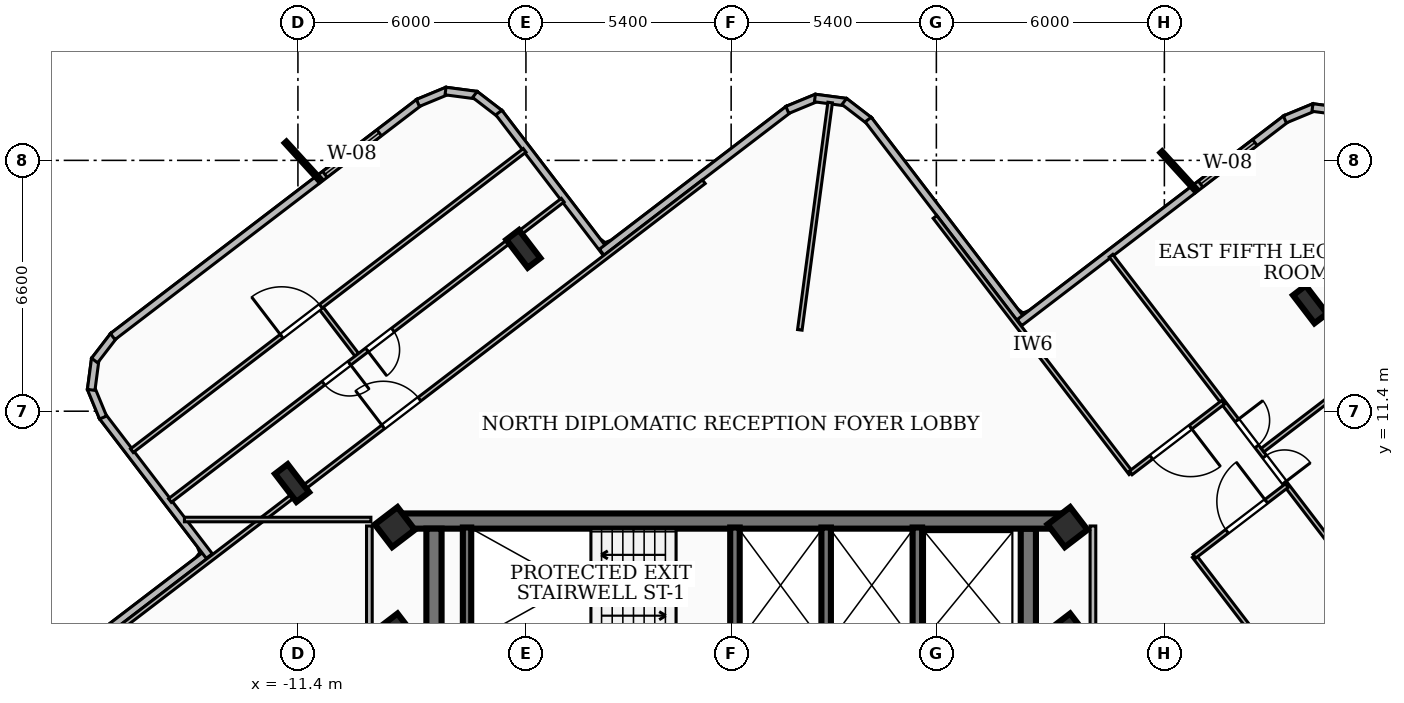
"""IFC4 building model, lengths in metres.
Left out: names, types, materials, properties, quantities, classifications, styles, units other than length and angle.
Written with IfcOpenShell. Run it as: python <this file> out.ifc"""

import sys

from ifc_helpers import new_model, si_unit, direction, frame, frame_2d, origin, origin_2d, place, context, subcontext, project, spatial, rectangle, i_section, extrude, element, fill, save


model = new_model("IFC4")
c1 = context("Model", 3, precision=1e-05, world=origin(), true_north=direction((0.0, 1.0)))
c2 = subcontext(c1, "Body", "Model", "MODEL_VIEW")
j1 = project(units=[si_unit("LENGTHUNIT", "METRE"), si_unit("PLANEANGLEUNIT", "RADIAN")], contexts=[c1])
p1 = place(None, origin())
s1 = spatial("IfcSite", under=j1, at=p1, CompositionType="ELEMENT")
p2 = place(p1, origin())
s2 = spatial("IfcBuilding", under=s1, at=p2, CompositionType="ELEMENT")
p3 = place(p2, frame((0.0, 0.0, 229.14)))
s3 = spatial("IfcBuildingStorey", under=s2, at=p3, CompositionType="ELEMENT", Elevation=229.14)
p4 = place(p3, frame((-8.78, 8.51, 0.0), z_axis=(0.0, 0.0, 1.0), x_axis=(1.0, 0.0, 0.0)))
e1 = element("IfcWall", 1, at=p4, inside=s3, PredefinedType="SHEAR", context=c2, shape_type="SweptSolid", body=[
    extrude(rectangle(XDim=17.56, YDim=0.4, at=frame_2d((8.78, 0.0))), origin(), (0.0, 0.0, 1.0), 3.14),
])
for number, where, z_axis, x_axis in (
    (2, (-7.82, 1.95, 0.0), (0.0, 0.0, 1.0), (0.0, 1.0, 0.0)),
    (3, (7.82, 8.31, 0.0), (0.0, 0.0, 1.0), (0.0, -1.0, 0.0)),
):
    element("IfcWall", number, at=place(p3, frame(where, z_axis=z_axis, x_axis=x_axis)), inside=s3, PredefinedType="SHEAR", context=c2, shape_type="SweptSolid", body=[
        extrude(rectangle(XDim=6.36, YDim=0.4, at=frame_2d((3.18, 0.0))), origin(), (0.0, 0.0, 1.0), 3.14),
    ])
p5 = place(p3, frame((-6.95, 5.28, 0.0), z_axis=(0.0, 0.0, 1.0), x_axis=(0.0, 1.0, 0.0)))
e4 = element("IfcWall", 4, at=p5, inside=s3, PredefinedType="SOLIDWALL", context=c2, shape_type="SweptSolid", body=[
    extrude(rectangle(XDim=3.06, YDim=0.22, at=frame_2d((1.53, 0.0))), origin(), (0.0, 0.0, 1.0), 3.14),
])
for number, where, z_axis, x_axis in (
    (5, (0.1, 5.3, 0.0), (0.0, 0.0, 1.0), (0.0, 1.0, 0.0)),
    (6, (2.5, 5.3, 0.0), (0.0, 0.0, 1.0), (0.0, 1.0, 0.0)),
    (7, (4.9, 5.3, 0.0), (0.0, 0.0, 1.0), (0.0, 1.0, 0.0)),
):
    element("IfcWall", number, at=place(p3, frame(where, z_axis=z_axis, x_axis=x_axis)), inside=s3, PredefinedType="SOLIDWALL", context=c2, shape_type="SweptSolid", body=[
        extrude(rectangle(XDim=3.04, YDim=0.25, at=frame_2d((1.52, 0.0))), origin(), (0.0, 0.0, 1.0), 3.14),
    ])
for number, where, z_axis, x_axis in (
    (8, (-8.85, 5.55, 0.0), (0.0, 0.0, 1.0), (0.794, 0.607, 0.0)),
    (9, (8.85, 5.55, 0.0), (0.0, 0.0, 1.0), (0.794, 0.607, 0.0)),
    (10, (-8.85, 8.35, 0.0), (0.0, 0.0, 1.0), (0.794, 0.607, 0.0)),
    (11, (8.85, 8.35, 0.0), (0.0, 0.0, 1.0), (0.794, 0.607, 0.0)),
):
    element("IfcColumn", number, at=place(p3, frame(where, z_axis=z_axis, x_axis=x_axis)), inside=s3, PredefinedType="COLUMN", context=c2, shape_type="SweptSolid", body=[
        extrude(rectangle(XDim=0.75, YDim=0.75, at=origin_2d()), origin(), (0.0, 0.0, 1.0), 3.42),
    ])
for number, where, z_axis, x_axis in (
    (12, (15.234, 14.209, 0.0), (0.0, 0.0, 1.0), (0.794, 0.607, 0.0)),
    (13, (-5.468, 15.671, 0.0), (0.0, 0.0, 1.0), (0.794, 0.607, 0.0)),
    (14, (-11.554, 9.51, 0.0), (0.0, 0.0, 1.0), (0.794, 0.607, 0.0)),
):
    element("IfcColumn", number, at=place(p3, frame(where, z_axis=z_axis, x_axis=x_axis)), inside=s3, PredefinedType="COLUMN", context=c2, shape_type="SweptSolid", body=[
        extrude(i_section(OverallWidth=0.418, OverallDepth=0.927, WebThickness=0.019, FlangeThickness=0.032, at=origin_2d()), origin(), (0.0, 0.0, 1.0), 3.42),
    ])
p6 = place(p3, frame((-19.074, 3.607, 0.0), z_axis=(0.0, 0.0, 1.0), x_axis=(0.794465731546, 0.607308983466, 0.0)))
e15 = element("IfcWall", 15, at=p6, inside=s3, PredefinedType="SOLIDWALL", context=c2, shape_type="SweptSolid", body=[
    extrude(rectangle(XDim=6.743, YDim=0.2, at=frame_2d((3.372, 0.0))), origin(), (0.0, 0.0, 1.0), 3.14),
])
p7 = place(p3, frame((-13.732, 7.589, 0.0), z_axis=(0.0, 0.0, 1.0), x_axis=(-0.607428636372, 0.794374251669, 0.0)))
e16 = element("IfcWall", 16, at=p7, inside=s3, PredefinedType="SOLIDWALL", context=c2, shape_type="SweptSolid", body=[
    extrude(rectangle(XDim=4.643, YDim=0.2, at=frame_2d((2.321, 0.0))), origin(), (0.0, 0.0, 1.0), 3.14),
])
p8 = place(p3, frame((-16.527, 11.234, 0.0), z_axis=(0.0, 0.0, 1.0), x_axis=(-0.381408676087, 0.924406524104, 0.0)))
e17 = element("IfcWall", 17, at=p8, inside=s3, PredefinedType="SOLIDWALL", context=c2, shape_type="SweptSolid", body=[
    extrude(rectangle(XDim=0.839, YDim=0.2, at=frame_2d((0.419, 0.0))), origin(), (0.0, 0.0, 1.0), 3.14),
])
p9 = place(p3, frame((-16.84, 11.961, 0.0), z_axis=(0.0, 0.0, 1.0), x_axis=(0.131059066172, 0.991374561492, 0.0)))
e18 = element("IfcWall", 18, at=p9, inside=s3, PredefinedType="SOLIDWALL", context=c2, shape_type="SweptSolid", body=[
    extrude(rectangle(XDim=0.825, YDim=0.2, at=frame_2d((0.413, 0.0))), origin(), (0.0, 0.0, 1.0), 3.14),
])
p10 = place(p3, frame((-16.75, 12.734, 0.0), z_axis=(0.0, 0.0, 1.0), x_axis=(0.609837482774, 0.792526494575, 0.0)))
e19 = element("IfcWall", 19, at=p10, inside=s3, PredefinedType="SOLIDWALL", context=c2, shape_type="SweptSolid", body=[
    extrude(rectangle(XDim=0.838, YDim=0.2, at=frame_2d((0.419, 0.0))), origin(), (0.0, 0.0, 1.0), 3.14),
])
p11 = place(p3, frame((-16.274, 13.363, 0.0), z_axis=(0.0, 0.0, 1.0), x_axis=(0.794458044917, 0.607319038781, 0.0)))
e20 = element("IfcWall", 20, at=p11, inside=s3, PredefinedType="SOLIDWALL", context=c2, shape_type="SweptSolid", body=[
    extrude(rectangle(XDim=10.164, YDim=0.2, at=frame_2d((5.082, 0.0))), origin(), (0.0, 0.0, 1.0), 3.14),
])
p12 = place(p11, frame((7.028, 0.0, 0.85)))
e21 = element("IfcOpeningElement", 21, at=p12, cuts=e20, PredefinedType="OPENING", context=c2, shape_type="SweptSolid", body=[
    extrude(rectangle(XDim=1.8, YDim=1.8, at=frame_2d((0.9, 0.9))), frame((0.0, 0.11, 0.0), z_axis=(0.0, -1.0, 0.0), x_axis=(1.0, 0.0, 0.0)), (0.0, 0.0, 1.0), 0.22),
])
p13 = place(p3, frame((-8.242, 19.511, 0.0), z_axis=(0.0, 0.0, 1.0), x_axis=(0.924091394431, 0.382171551451, 0.0)))
e22 = element("IfcWall", 22, at=p13, inside=s3, PredefinedType="SOLIDWALL", context=c2, shape_type="SweptSolid", body=[
    extrude(rectangle(XDim=0.837, YDim=0.2, at=frame_2d((0.419, 0.0))), origin(), (0.0, 0.0, 1.0), 3.14),
])
p14 = place(p3, frame((-7.516, 19.824, 0.0), z_axis=(0.0, 0.0, 1.0), x_axis=(0.991412958994, -0.130768286444, 0.0)))
e23 = element("IfcWall", 23, at=p14, inside=s3, PredefinedType="SOLIDWALL", context=c2, shape_type="SweptSolid", body=[
    extrude(rectangle(XDim=0.825, YDim=0.2, at=frame_2d((0.413, 0.0))), origin(), (0.0, 0.0, 1.0), 3.14),
])
p15 = place(p3, frame((-6.743, 19.734, 0.0), z_axis=(0.0, 0.0, 1.0), x_axis=(0.792959338773, -0.609274558022, 0.0)))
e24 = element("IfcWall", 24, at=p15, inside=s3, PredefinedType="SOLIDWALL", context=c2, shape_type="SweptSolid", body=[
    extrude(rectangle(XDim=0.839, YDim=0.2, at=frame_2d((0.419, 0.0))), origin(), (0.0, 0.0, 1.0), 3.14),
])
p16 = place(p3, frame((-6.113, 19.258, 0.0), z_axis=(0.0, 0.0, 1.0), x_axis=(0.607327150699, -0.794451843741, 0.0)))
e25 = element("IfcWall", 25, at=p16, inside=s3, PredefinedType="SOLIDWALL", context=c2, shape_type="SweptSolid", body=[
    extrude(rectangle(XDim=4.643, YDim=0.2, at=frame_2d((2.322, 0.0))), origin(), (0.0, 0.0, 1.0), 3.14),
])
p17 = place(p3, frame((-3.406, 15.584, 0.0), z_axis=(0.0, 0.0, 1.0), x_axis=(0.794329901805, 0.60748663121, 0.0)))
e26 = element("IfcWall", 26, at=p17, inside=s3, PredefinedType="SOLIDWALL", context=c2, shape_type="SweptSolid", body=[
    extrude(rectangle(XDim=6.203, YDim=0.2, at=frame_2d((3.101, 0.0))), origin(), (0.0, 0.0, 1.0), 3.14),
])
p18 = place(p3, frame((1.478, 19.327, 0.0), z_axis=(0.0, 0.0, 1.0), x_axis=(0.924091394431, 0.382171551451, 0.0)))
e27 = element("IfcWall", 27, at=p18, inside=s3, PredefinedType="SOLIDWALL", context=c2, shape_type="SweptSolid", body=[
    extrude(rectangle(XDim=0.837, YDim=0.2, at=frame_2d((0.419, 0.0))), origin(), (0.0, 0.0, 1.0), 3.14),
])
p19 = place(p3, frame((2.204, 19.64, 0.0), z_axis=(0.0, 0.0, 1.0), x_axis=(0.99140789753, -0.130806653943, 0.0)))
e28 = element("IfcWall", 28, at=p19, inside=s3, PredefinedType="SOLIDWALL", context=c2, shape_type="SweptSolid", body=[
    extrude(rectangle(XDim=0.825, YDim=0.2, at=frame_2d((0.413, 0.0))), origin(), (0.0, 0.0, 1.0), 3.14),
])
p20 = place(p3, frame((2.977, 19.55, 0.0), z_axis=(0.0, 0.0, 1.0), x_axis=(0.792959338773, -0.609274558022, 0.0)))
e29 = element("IfcWall", 29, at=p20, inside=s3, PredefinedType="SOLIDWALL", context=c2, shape_type="SweptSolid", body=[
    extrude(rectangle(XDim=0.839, YDim=0.2, at=frame_2d((0.419, 0.0))), origin(), (0.0, 0.0, 1.0), 3.14),
])
p21 = place(p3, frame((3.607, 19.074, 0.0), z_axis=(0.0, 0.0, 1.0), x_axis=(0.607308983466, -0.794465731546, 0.0)))
e30 = element("IfcWall", 30, at=p21, inside=s3, PredefinedType="SOLIDWALL", context=c2, shape_type="SweptSolid", body=[
    extrude(rectangle(XDim=6.743, YDim=0.2, at=frame_2d((3.372, 0.0))), origin(), (0.0, 0.0, 1.0), 3.14),
])
p22 = place(p3, frame((7.589, 13.732, 0.0), z_axis=(0.0, 0.0, 1.0), x_axis=(0.794365670067, 0.607439858932, 0.0)))
e31 = element("IfcWall", 31, at=p22, inside=s3, PredefinedType="SOLIDWALL", context=c2, shape_type="SweptSolid", body=[
    extrude(rectangle(XDim=8.842, YDim=0.2, at=frame_2d((4.421, 0.0))), origin(), (0.0, 0.0, 1.0), 3.14),
])
p23 = place(p22, frame((5.997, 0.0, 0.85)))
e32 = element("IfcOpeningElement", 32, at=p23, cuts=e31, PredefinedType="OPENING", context=c2, shape_type="SweptSolid", body=[
    extrude(rectangle(XDim=1.8, YDim=1.8, at=frame_2d((0.9, 0.9))), frame((0.0, 0.11, 0.0), z_axis=(0.0, -1.0, 0.0), x_axis=(1.0, 0.0, 0.0)), (0.0, 0.0, 1.0), 0.22),
])
p24 = place(p3, frame((14.57, 19.078, 0.0), z_axis=(0.0, 0.0, 1.0), x_axis=(0.92426142649, 0.38176015442, 0.0)))
e33 = element("IfcWall", 33, at=p24, inside=s3, PredefinedType="SOLIDWALL", context=c2, shape_type="SweptSolid", body=[
    extrude(rectangle(XDim=0.838, YDim=0.2, at=frame_2d((0.419, 0.0))), origin(), (0.0, 0.0, 1.0), 3.14),
])
p25 = place(p3, frame((15.297, 19.391, 0.0), z_axis=(0.0, 0.0, 1.0), x_axis=(0.991369477691, -0.131097516005, 0.0)))
e34 = element("IfcWall", 34, at=p25, inside=s3, PredefinedType="SOLIDWALL", context=c2, shape_type="SweptSolid", body=[
    extrude(rectangle(XDim=0.825, YDim=0.2, at=frame_2d((0.413, 0.0))), origin(), (0.0, 0.0, 1.0), 3.14),
])
p26 = place(p3, frame((22.594, 8.664, 0.0), z_axis=(0.0, 0.0, 1.0), x_axis=(-0.794406416539, -0.607386569954, 0.0)))
e35 = element("IfcWall", 35, at=p26, inside=s3, PredefinedType="SOLIDWALL", context=c2, shape_type="SweptSolid", body=[
    extrude(rectangle(XDim=8.843, YDim=0.2, at=frame_2d((4.421, 0.0))), origin(), (0.0, 0.0, 1.0), 3.14),
])
p27 = place(p26, frame((0.85, 0.0, 0.85)))
e36 = element("IfcOpeningElement", 36, at=p27, cuts=e35, PredefinedType="OPENING", context=c2, shape_type="SweptSolid", body=[
    extrude(rectangle(XDim=2.4, YDim=2.1, at=frame_2d((1.2, 1.05))), frame((0.0, 0.11, 0.0), z_axis=(0.0, -1.0, 0.0), x_axis=(1.0, 0.0, 0.0)), (0.0, 0.0, 1.0), 0.22),
])
p28 = place(p3, frame((-9.52, 1.75, 0.0), z_axis=(0.0, 0.0, 1.0), x_axis=(0.0, 1.0, 0.0)))
e37 = element("IfcWall", 37, at=p28, inside=s3, PredefinedType="PARTITIONING", context=c2, shape_type="SweptSolid", body=[
    extrude(rectangle(XDim=6.63, YDim=0.15, at=frame_2d((3.315, 0.0))), origin(), (0.0, 0.0, 1.0), 3.14),
])
p29 = place(p3, frame((9.52, 1.75, 0.0), z_axis=(0.0, 0.0, 1.0), x_axis=(0.0, 1.0, 0.0)))
e38 = element("IfcWall", 38, at=p29, inside=s3, PredefinedType="PARTITIONING", context=c2, shape_type="SweptSolid", body=[
    extrude(rectangle(XDim=6.63, YDim=0.15, at=frame_2d((3.315, 0.0))), origin(), (0.0, 0.0, 1.0), 2.51),
])
p30 = place(p3, frame((-14.386, 8.55, 0.0), z_axis=(0.0, 0.0, 1.0), x_axis=(1.0, 0.0, 0.0)))
e39 = element("IfcWall", 39, at=p30, inside=s3, PredefinedType="PARTITIONING", context=c2, shape_type="SweptSolid", body=[
    extrude(rectangle(XDim=4.906, YDim=0.12, at=frame_2d((2.453, 0.0))), origin(), (0.0, 0.0, 1.0), 2.51),
])
p31 = place(p3, frame((1.807, 13.54, 0.0), z_axis=(0.0, 0.0, 1.0), x_axis=(0.132245865303, 0.991216944523, 0.0)))
e40 = element("IfcWall", 40, at=p31, inside=s3, PredefinedType="PARTITIONING", context=c2, shape_type="SweptSolid", body=[
    extrude(rectangle(XDim=6.035, YDim=0.12, at=frame_2d((3.018, 0.0))), origin(), (0.0, 0.0, 1.0), 3.14),
])
p32 = place(p3, frame((10.52, 9.768, 0.0), z_axis=(0.0, 0.0, 1.0), x_axis=(-0.607441568234, 0.794364362985, 0.0)))
e41 = element("IfcWall", 41, at=p32, inside=s3, PredefinedType="PARTITIONING", context=c2, shape_type="SweptSolid", body=[
    extrude(rectangle(XDim=8.49, YDim=0.12, at=frame_2d((4.245, 0.0))), origin(), (0.0, 0.0, 1.0), 2.51),
])
p33 = place(p3, frame((17.012, 1.275, 0.0), z_axis=(0.0, 0.0, 1.0), x_axis=(-0.60728139249, 0.794486822003, 0.0)))
e42 = element("IfcWall", 42, at=p33, inside=s3, PredefinedType="PARTITIONING", context=c2, shape_type="SweptSolid", body=[
    extrude(rectangle(XDim=7.95, YDim=0.12, at=frame_2d((3.975, 0.0))), origin(), (0.0, 0.0, 1.0), 3.14),
])
p34 = place(p3, frame((12.945, 11.634, 0.0), z_axis=(0.0, 0.0, 1.0), x_axis=(-0.794509541066, -0.607251668714, 0.0)))
e43 = element("IfcWall", 43, at=p34, inside=s3, PredefinedType="PARTITIONING", context=c2, shape_type="SweptSolid", body=[
    extrude(rectangle(XDim=3.06, YDim=0.12, at=frame_2d((1.53, 0.0))), origin(), (0.0, 0.0, 1.0), 2.51),
])
p35 = place(p34, frame((1.08, 0.0, 0.0)))
e44 = element("IfcOpeningElement", 44, at=p35, cuts=e43, PredefinedType="OPENING", context=c2, shape_type="SweptSolid", body=[
    extrude(rectangle(XDim=1.3, YDim=2.1, at=frame_2d((0.65, 1.05))), frame((0.0, 0.07, 0.0), z_axis=(0.0, -1.0, 0.0), x_axis=(1.0, 0.0, 0.0)), (0.0, 0.0, 1.0), 0.14),
])
p36 = place(p3, frame((12.19, 7.583, 0.0), z_axis=(0.0, 0.0, 1.0), x_axis=(0.794394061013, 0.607402729519, 0.0)))
e45 = element("IfcWall", 45, at=p36, inside=s3, PredefinedType="PARTITIONING", context=c2, shape_type="SweptSolid", body=[
    extrude(rectangle(XDim=3.06, YDim=0.12, at=frame_2d((1.53, 0.0))), origin(), (0.0, 0.0, 1.0), 2.51),
])
p37 = place(p36, frame((1.08, 0.0, 0.0)))
e46 = element("IfcOpeningElement", 46, at=p37, cuts=e45, PredefinedType="OPENING", context=c2, shape_type="SweptSolid", body=[
    extrude(rectangle(XDim=1.3, YDim=2.1, at=frame_2d((0.65, 1.05))), frame((0.0, 0.07, 0.0), z_axis=(0.0, -1.0, 0.0), x_axis=(1.0, 0.0, 0.0)), (0.0, 0.0, 1.0), 0.14),
])
p38 = place(p3, frame((13.983, 10.376, 0.0), z_axis=(0.0, 0.0, 1.0), x_axis=(0.794405792036, 0.607387386747, 0.0)))
e47 = element("IfcWall", 47, at=p38, inside=s3, PredefinedType="PARTITIONING", context=c2, shape_type="SweptSolid", body=[
    extrude(rectangle(XDim=7.224, YDim=0.12, at=frame_2d((3.612, 0.0))), origin(), (0.0, 0.0, 1.0), 3.14),
])
p39 = place(p3, frame((9.996, 15.491, 0.0), z_axis=(0.0, 0.0, 1.0), x_axis=(0.607384628916, -0.794407900613, 0.0)))
e48 = element("IfcWall", 48, at=p39, inside=s3, PredefinedType="PARTITIONING", context=c2, shape_type="SweptSolid", body=[
    extrude(rectangle(XDim=13.01, YDim=0.12, at=frame_2d((6.505, 0.0))), origin(), (0.0, 0.0, 1.0), 2.51),
])
p40 = place(p39, frame((6.655, 0.0, 0.0)))
e49 = element("IfcOpeningElement", 49, at=p40, cuts=e48, PredefinedType="OPENING", context=c2, shape_type="SweptSolid", body=[
    extrude(rectangle(XDim=0.86, YDim=2.04, at=frame_2d((0.43, 1.02))), frame((0.0, 0.07, 0.0), z_axis=(0.0, -1.0, 0.0), x_axis=(1.0, 0.0, 0.0)), (0.0, 0.0, 1.0), 0.14),
])
p41 = place(p39, frame((5.455, 0.0, 0.0)))
e50 = element("IfcOpeningElement", 50, at=p41, cuts=e48, PredefinedType="OPENING", context=c2, shape_type="SweptSolid", body=[
    extrude(rectangle(XDim=0.86, YDim=2.04, at=frame_2d((0.43, 1.02))), frame((0.0, 0.07, 0.0), z_axis=(0.0, -1.0, 0.0), x_axis=(1.0, 0.0, 0.0)), (0.0, 0.0, 1.0), 0.14),
])
p42 = place(p3, frame((-17.068, 4.939, 0.0), z_axis=(0.0, 0.0, 1.0), x_axis=(0.794433927634, 0.607350586255, 0.0)))
e51 = element("IfcWall", 51, at=p42, inside=s3, PredefinedType="PARTITIONING", context=c2, shape_type="SweptSolid", body=[
    extrude(rectangle(XDim=20.58, YDim=0.12, at=frame_2d((10.29, 0.0))), origin(), (0.0, 0.0, 1.0), 2.51),
])
p43 = place(p42, frame((9.96, 0.0, 0.0)))
e52 = element("IfcOpeningElement", 52, at=p43, cuts=e51, PredefinedType="OPENING", context=c2, shape_type="SweptSolid", body=[
    extrude(rectangle(XDim=1.2, YDim=2.1, at=frame_2d((0.6, 1.05))), frame((0.0, 0.07, 0.0), z_axis=(0.0, -1.0, 0.0), x_axis=(1.0, 0.0, 0.0)), (0.0, 0.0, 1.0), 0.14),
])
p44 = place(p3, frame((-9.852, 12.885, 0.0), z_axis=(0.0, 0.0, 1.0), x_axis=(-0.607047349334, 0.794665662821, 0.0)))
e53 = element("IfcWall", 53, at=p44, inside=s3, PredefinedType="PARTITIONING", context=c2, shape_type="SweptSolid", body=[
    extrude(rectangle(XDim=1.53, YDim=0.12, at=frame_2d((0.765, 0.0))), origin(), (0.0, 0.0, 1.0), 3.14),
])
p45 = place(p3, frame((-4.433, 16.952, 0.0), z_axis=(0.0, 0.0, 1.0), x_axis=(-0.794407900613, -0.607384628916, 0.0)))
e54 = element("IfcWall", 54, at=p45, inside=s3, PredefinedType="PARTITIONING", context=c2, shape_type="SweptSolid", body=[
    extrude(rectangle(XDim=13.01, YDim=0.12, at=frame_2d((6.505, 0.0))), origin(), (0.0, 0.0, 1.0), 3.14),
])
p46 = place(p45, frame((5.625, 0.0, 0.0)))
e55 = element("IfcOpeningElement", 55, at=p46, cuts=e54, PredefinedType="OPENING", context=c2, shape_type="SweptSolid", body=[
    extrude(rectangle(XDim=0.86, YDim=2.04, at=frame_2d((0.43, 1.02))), frame((0.0, 0.07, 0.0), z_axis=(0.0, -1.0, 0.0), x_axis=(1.0, 0.0, 0.0)), (0.0, 0.0, 1.0), 0.14),
])
p47 = place(p45, frame((7.065, 0.0, 0.0)))
e56 = element("IfcOpeningElement", 56, at=p47, cuts=e54, PredefinedType="OPENING", context=c2, shape_type="SweptSolid", body=[
    extrude(rectangle(XDim=0.86, YDim=2.04, at=frame_2d((0.43, 1.02))), frame((0.0, 0.07, 0.0), z_axis=(0.0, -1.0, 0.0), x_axis=(1.0, 0.0, 0.0)), (0.0, 0.0, 1.0), 0.14),
])
p48 = place(p3, frame((-15.77, 10.361, 0.0), z_axis=(0.0, 0.0, 1.0), x_axis=(0.794407900613, 0.607384628916, 0.0)))
e57 = element("IfcWall", 57, at=p48, inside=s3, PredefinedType="PARTITIONING", context=c2, shape_type="SweptSolid", body=[
    extrude(rectangle(XDim=13.01, YDim=0.12, at=frame_2d((6.505, 0.0))), origin(), (0.0, 0.0, 1.0), 3.14),
])
p49 = place(p48, frame((4.96, 0.0, 0.0)))
e58 = element("IfcOpeningElement", 58, at=p49, cuts=e57, PredefinedType="OPENING", context=c2, shape_type="SweptSolid", body=[
    extrude(rectangle(XDim=1.3, YDim=2.1, at=frame_2d((0.65, 1.05))), frame((0.0, 0.07, 0.0), z_axis=(0.0, -1.0, 0.0), x_axis=(1.0, 0.0, 0.0)), (0.0, 0.0, 1.0), 0.14),
])
p50 = place(p12, origin())
e59 = element("IfcWindow", 59, at=p50, inside=s3, PartitioningType="SINGLE_PANEL", PredefinedType="WINDOW", context=c2, shape_type="SweptSolid", body=[
    extrude(rectangle(XDim=1.8, YDim=1.8, at=frame_2d((0.9, 0.9))), frame((0.0, 0.03, 0.0), z_axis=(0.0, -1.0, 0.0), x_axis=(1.0, 0.0, 0.0)), (0.0, 0.0, 1.0), 0.06),
])
fill(e21, e59)
p51 = place(p23, origin())
e60 = element("IfcWindow", 60, at=p51, inside=s3, PartitioningType="SINGLE_PANEL", PredefinedType="WINDOW", context=c2, shape_type="SweptSolid", body=[
    extrude(rectangle(XDim=1.8, YDim=1.8, at=frame_2d((0.9, 0.9))), frame((0.0, 0.03, 0.0), z_axis=(0.0, -1.0, 0.0), x_axis=(1.0, 0.0, 0.0)), (0.0, 0.0, 1.0), 0.06),
])
fill(e32, e60)
p52 = place(p35, origin())
e61 = element("IfcDoor", 61, at=p52, inside=s3, OperationType="SINGLE_SWING_LEFT", PredefinedType="DOOR", context=c2, shape_type="SweptSolid", body=[
    extrude(rectangle(XDim=1.3, YDim=2.1, at=frame_2d((0.65, 1.05))), frame((0.0, 0.025, 0.0), z_axis=(0.0, -1.0, 0.0), x_axis=(1.0, 0.0, 0.0)), (0.0, 0.0, 1.0), 0.05),
])
fill(e44, e61)
p53 = place(p37, origin())
e62 = element("IfcDoor", 62, at=p53, inside=s3, OperationType="SINGLE_SWING_RIGHT", PredefinedType="DOOR", context=c2, shape_type="SweptSolid", body=[
    extrude(rectangle(XDim=1.3, YDim=2.1, at=frame_2d((0.65, 1.05))), frame((0.0, 0.025, 0.0), z_axis=(0.0, -1.0, 0.0), x_axis=(1.0, 0.0, 0.0)), (0.0, 0.0, 1.0), 0.05),
])
fill(e46, e62)
p54 = place(p40, origin())
e63 = element("IfcDoor", 63, at=p54, inside=s3, OperationType="SINGLE_SWING_RIGHT", PredefinedType="DOOR", context=c2, shape_type="SweptSolid", body=[
    extrude(rectangle(XDim=0.86, YDim=2.04, at=frame_2d((0.43, 1.02))), frame((0.0, 0.025, 0.0), z_axis=(0.0, -1.0, 0.0), x_axis=(1.0, 0.0, 0.0)), (0.0, 0.0, 1.0), 0.05),
])
fill(e49, e63)
p55 = place(p41, origin())
e64 = element("IfcDoor", 64, at=p55, inside=s3, OperationType="SINGLE_SWING_LEFT", PredefinedType="DOOR", context=c2, shape_type="SweptSolid", body=[
    extrude(rectangle(XDim=0.86, YDim=2.04, at=frame_2d((0.43, 1.02))), frame((0.0, 0.025, 0.0), z_axis=(0.0, -1.0, 0.0), x_axis=(1.0, 0.0, 0.0)), (0.0, 0.0, 1.0), 0.05),
])
fill(e50, e64)
p56 = place(p43, origin())
e65 = element("IfcDoor", 65, at=p56, inside=s3, OperationType="SINGLE_SWING_LEFT", PredefinedType="DOOR", context=c2, shape_type="SweptSolid", body=[
    extrude(rectangle(XDim=1.2, YDim=2.1, at=frame_2d((0.6, 1.05))), frame((0.0, 0.025, 0.0), z_axis=(0.0, -1.0, 0.0), x_axis=(1.0, 0.0, 0.0)), (0.0, 0.0, 1.0), 0.05),
])
fill(e52, e65)
p57 = place(p46, origin())
e66 = element("IfcDoor", 66, at=p57, inside=s3, OperationType="SINGLE_SWING_RIGHT", PredefinedType="DOOR", context=c2, shape_type="SweptSolid", body=[
    extrude(rectangle(XDim=0.86, YDim=2.04, at=frame_2d((0.43, 1.02))), frame((0.0, 0.025, 0.0), z_axis=(0.0, -1.0, 0.0), x_axis=(1.0, 0.0, 0.0)), (0.0, 0.0, 1.0), 0.05),
])
fill(e55, e66)
p58 = place(p47, origin())
e67 = element("IfcDoor", 67, at=p58, inside=s3, OperationType="SINGLE_SWING_LEFT", PredefinedType="DOOR", context=c2, shape_type="SweptSolid", body=[
    extrude(rectangle(XDim=0.86, YDim=2.04, at=frame_2d((0.43, 1.02))), frame((0.0, 0.025, 0.0), z_axis=(0.0, -1.0, 0.0), x_axis=(1.0, 0.0, 0.0)), (0.0, 0.0, 1.0), 0.05),
])
fill(e56, e67)
p59 = place(p49, origin())
e68 = element("IfcDoor", 68, at=p59, inside=s3, OperationType="SINGLE_SWING_LEFT", PredefinedType="DOOR", context=c2, shape_type="SweptSolid", body=[
    extrude(rectangle(XDim=1.3, YDim=2.1, at=frame_2d((0.65, 1.05))), frame((0.0, 0.025, 0.0), z_axis=(0.0, -1.0, 0.0), x_axis=(1.0, 0.0, 0.0)), (0.0, 0.0, 1.0), 0.05),
])
fill(e58, e68)
save(model, sys.argv[1])
